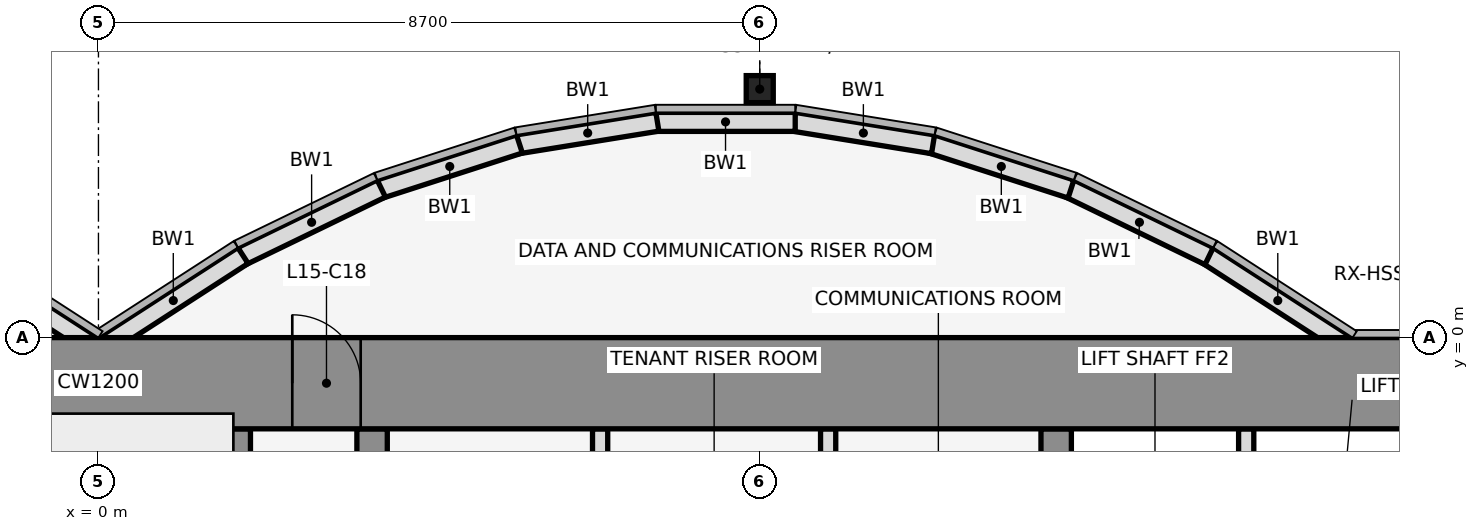
"""IFC4 building model, lengths in metres.
Left out: names, types, materials, properties, quantities, classifications, styles, units other than length and angle.
Written with IfcOpenShell. Run it as: python <this file> out.ifc"""

import sys

from ifc_helpers import new_model, si_unit, direction, frame, frame_2d, origin, origin_2d, place, context, subcontext, project, spatial, rectangle, hollow_rectangle, extrude, element, fill, save


model = new_model("IFC4")
c1 = context("Model", 3, precision=1e-05, world=origin(), true_north=direction((0.0, 1.0)))
c2 = subcontext(c1, "Body", "Model", "MODEL_VIEW")
j1 = project(units=[si_unit("LENGTHUNIT", "METRE"), si_unit("PLANEANGLEUNIT", "RADIAN")], contexts=[c1])
p1 = place(None, origin())
s1 = spatial("IfcSite", under=j1, at=p1, CompositionType="ELEMENT")
p2 = place(p1, origin())
s2 = spatial("IfcBuilding", under=s1, at=p2, CompositionType="ELEMENT")
p3 = place(p2, frame((0.0, 0.0, 75.5)))
s3 = spatial("IfcBuildingStorey", under=s2, at=p3, CompositionType="ELEMENT", Elevation=75.5)
p4 = place(p3, frame((8.7, 3.269, 0.0), z_axis=(0.0, 0.0, 1.0), x_axis=(1.0, 0.0, 0.0)))
e1 = element("IfcColumn", 1, at=p4, inside=s3, PredefinedType="COLUMN", context=c2, shape_type="SweptSolid", body=[
    extrude(hollow_rectangle(XDim=0.356, YDim=0.356, WallThickness=0.012, at=origin_2d()), origin(), (0.0, 0.0, 1.0), 4.5),
])
p5 = place(p3, frame((16.432, -0.105, 0.0), z_axis=(0.0, 0.0, 1.0), x_axis=(-0.83981312244, 0.542875602121, 0.0)))
e2 = element("IfcWall", 2, at=p5, inside=s3, PredefinedType="STANDARD", context=c2, shape_type="SweptSolid", body=[
    extrude(rectangle(XDim=2.183, YDim=0.25, at=frame_2d((1.091, 0.0))), origin(), (0.0, 0.0, 1.0), 4.35),
])
p6 = place(p3, frame((14.612, 1.073, 0.0), z_axis=(0.0, 0.0, 1.0), x_axis=(-0.89982408427, 0.436252928206, 0.0)))
e3 = element("IfcWall", 3, at=p6, inside=s3, PredefinedType="STANDARD", context=c2, shape_type="SweptSolid", body=[
    extrude(rectangle(XDim=2.038, YDim=0.25, at=frame_2d((1.019, 0.0))), origin(), (0.0, 0.0, 1.0), 4.35),
])
p7 = place(p3, frame((12.795, 1.955, 0.0), z_axis=(0.0, 0.0, 1.0), x_axis=(-0.951495806175, 0.307661714928, 0.0)))
e4 = element("IfcWall", 4, at=p7, inside=s3, PredefinedType="STANDARD", context=c2, shape_type="SweptSolid", body=[
    extrude(rectangle(XDim=1.927, YDim=0.25, at=frame_2d((0.963, 0.0))), origin(), (0.0, 0.0, 1.0), 4.35),
])
p8 = place(p3, frame((10.98, 2.543, 0.0), z_axis=(0.0, 0.0, 1.0), x_axis=(-0.987181718931, 0.159600293885, 0.0)))
e5 = element("IfcWall", 5, at=p8, inside=s3, PredefinedType="STANDARD", context=c2, shape_type="SweptSolid", body=[
    extrude(rectangle(XDim=1.857, YDim=0.25, at=frame_2d((0.929, 0.0))), origin(), (0.0, 0.0, 1.0), 4.35),
])
p9 = place(p3, frame((9.167, 2.838, 0.0), z_axis=(0.0, 0.0, 1.0), x_axis=(-1.0, 0.0, 0.0)))
e6 = element("IfcWall", 6, at=p9, inside=s3, PredefinedType="STANDARD", context=c2, shape_type="SweptSolid", body=[
    extrude(rectangle(XDim=1.833, YDim=0.25, at=frame_2d((0.917, 0.0))), origin(), (0.0, 0.0, 1.0), 4.35),
])
p10 = place(p3, frame((7.353, 2.84, 0.0), z_axis=(0.0, 0.0, 1.0), x_axis=(-0.987181718931, -0.159600293885, 0.0)))
e7 = element("IfcWall", 7, at=p10, inside=s3, PredefinedType="STANDARD", context=c2, shape_type="SweptSolid", body=[
    extrude(rectangle(XDim=1.857, YDim=0.25, at=frame_2d((0.929, 0.0))), origin(), (0.0, 0.0, 1.0), 4.35),
])
p11 = place(p3, frame((5.538, 2.548, 0.0), z_axis=(0.0, 0.0, 1.0), x_axis=(-0.951495806175, -0.307661714928, 0.0)))
e8 = element("IfcWall", 8, at=p11, inside=s3, PredefinedType="STANDARD", context=c2, shape_type="SweptSolid", body=[
    extrude(rectangle(XDim=1.927, YDim=0.25, at=frame_2d((0.963, 0.0))), origin(), (0.0, 0.0, 1.0), 4.35),
])
p12 = place(p3, frame((3.721, 1.962, 0.0), z_axis=(0.0, 0.0, 1.0), x_axis=(-0.89982408427, -0.436252928206, 0.0)))
e9 = element("IfcWall", 9, at=p12, inside=s3, PredefinedType="STANDARD", context=c2, shape_type="SweptSolid", body=[
    extrude(rectangle(XDim=2.038, YDim=0.25, at=frame_2d((1.019, 0.0))), origin(), (0.0, 0.0, 1.0), 4.35),
])
for number, where, z_axis, x_axis in (
    (10, (1.901, 1.08, 0.0), (0.0, 0.0, 1.0), (-0.84, -0.543, 0.0)),
    (11, (-0.068, -0.105, 0.0), (0.0, 0.0, 1.0), (-0.84, 0.543, 0.0)),
):
    element("IfcWall", number, at=place(p3, frame(where, z_axis=z_axis, x_axis=x_axis)), inside=s3, PredefinedType="STANDARD", context=c2, shape_type="SweptSolid", body=[
        extrude(rectangle(XDim=2.183, YDim=0.25, at=frame_2d((1.091, 0.0))), origin(), (0.0, 0.0, 1.0), 4.35),
    ])
p13 = place(p3, frame((1.8, -11.8, 0.0), z_axis=(0.0, 0.0, 1.0), x_axis=(0.0, 1.0, 0.0)))
e12 = element("IfcWall", 12, at=p13, inside=s3, PredefinedType="SHEAR", context=c2, shape_type="SweptSolid", body=[
    extrude(rectangle(XDim=10.6, YDim=0.4, at=frame_2d((5.3, 0.0))), origin(), (0.0, 0.0, 1.0), 4.5),
])
p14 = place(p3, frame((3.6, -11.8, 0.0), z_axis=(0.0, 0.0, 1.0), x_axis=(0.0, 1.0, 0.0)))
e13 = element("IfcWall", 13, at=p14, inside=s3, PredefinedType="SHEAR", context=c2, shape_type="SweptSolid", body=[
    extrude(rectangle(XDim=10.6, YDim=0.4, at=frame_2d((5.3, 0.0))), origin(), (0.0, 0.0, 1.0), 4.5),
])
p15 = place(p14, frame((1.35, 0.0, 0.0)))
e14 = element("IfcOpeningElement", 14, at=p15, cuts=e13, PredefinedType="OPENING", context=c2, shape_type="SweptSolid", body=[
    extrude(rectangle(XDim=0.9, YDim=2.1, at=frame_2d((0.45, 1.05))), frame((0.0, 0.212, 0.0), z_axis=(0.0, -1.0, 0.0), x_axis=(1.0, 0.0, 0.0)), (0.0, 0.0, 1.0), 0.424),
])
for number, where, z_axis, x_axis in (
    (15, (6.6, -4.6, 0.0), (0.0, 0.0, 1.0), (0.0, 1.0, 0.0)),
    (16, (9.6, -4.6, 0.0), (0.0, 0.0, 1.0), (0.0, 1.0, 0.0)),
):
    element("IfcWall", number, at=place(p3, frame(where, z_axis=z_axis, x_axis=x_axis)), inside=s3, PredefinedType="PARTITIONING", context=c2, shape_type="SweptSolid", body=[
        extrude(rectangle(XDim=3.4, YDim=0.2, at=frame_2d((1.7, 0.0))), origin(), (0.0, 0.0, 1.0), 3.339),
    ])
p16 = place(p3, frame((12.6, -11.8, 0.0), z_axis=(0.0, 0.0, 1.0), x_axis=(0.0, 1.0, 0.0)))
e17 = element("IfcWall", 17, at=p16, inside=s3, PredefinedType="SHEAR", context=c2, shape_type="SweptSolid", body=[
    extrude(rectangle(XDim=10.6, YDim=0.4, at=frame_2d((5.3, 0.0))), origin(), (0.0, 0.0, 1.0), 4.5),
])
p17 = place(p16, frame((4.75, 0.0, 0.0)))
e18 = element("IfcOpeningElement", 18, at=p17, cuts=e17, PredefinedType="OPENING", context=c2, shape_type="SweptSolid", body=[
    extrude(rectangle(XDim=1.1, YDim=2.1, at=frame_2d((0.55, 1.05))), frame((0.0, 0.212, 0.0), z_axis=(0.0, -1.0, 0.0), x_axis=(1.0, 0.0, 0.0)), (0.0, 0.0, 1.0), 0.424),
])
p18 = place(p3, frame((15.1, -4.6, 0.0), z_axis=(0.0, 0.0, 1.0), x_axis=(0.0, 1.0, 0.0)))
e19 = element("IfcWall", 19, at=p18, inside=s3, PredefinedType="PARTITIONING", context=c2, shape_type="SweptSolid", body=[
    extrude(rectangle(XDim=3.4, YDim=0.2, at=frame_2d((1.7, 0.0))), origin(), (0.0, 0.0, 1.0), 3.339),
])
p19 = place(p3, frame((-22.0, -0.6, 0.0), z_axis=(0.0, 0.0, 1.0), x_axis=(1.0, 0.0, 0.0)))
e20 = element("IfcWall", 20, at=p19, inside=s3, PredefinedType="SHEAR", context=c2, shape_type="SweptSolid", body=[
    extrude(rectangle(XDim=44.0, YDim=1.2, at=frame_2d((22.0, 0.0))), origin(), (0.0, 0.0, 1.0), 4.5),
])
p20 = place(p19, frame((18.55, 0.0, 0.0)))
e21 = element("IfcOpeningElement", 21, at=p20, cuts=e20, PredefinedType="OPENING", context=c2, shape_type="SweptSolid", body=[
    extrude(rectangle(XDim=0.9, YDim=2.1, at=frame_2d((0.45, 1.05))), frame((0.0, 0.612, 0.0), z_axis=(0.0, -1.0, 0.0), x_axis=(1.0, 0.0, 0.0)), (0.0, 0.0, 1.0), 1.224),
])
p21 = place(p19, frame((24.55, 0.0, 0.0)))
e22 = element("IfcOpeningElement", 22, at=p21, cuts=e20, PredefinedType="OPENING", context=c2, shape_type="SweptSolid", body=[
    extrude(rectangle(XDim=0.9, YDim=2.1, at=frame_2d((0.45, 1.05))), frame((0.0, 0.612, 0.0), z_axis=(0.0, -1.0, 0.0), x_axis=(1.0, 0.0, 0.0)), (0.0, 0.0, 1.0), 1.224),
])
p22 = place(p21, origin())
e23 = element("IfcDoor", 23, at=p22, inside=s3, OperationType="SINGLE_SWING_LEFT", PredefinedType="DOOR", context=c2, shape_type="SweptSolid", body=[
    extrude(rectangle(XDim=0.9, YDim=2.1, at=frame_2d((0.45, 1.05))), frame((0.0, 0.025, 0.0), z_axis=(0.0, -1.0, 0.0), x_axis=(1.0, 0.0, 0.0)), (0.0, 0.0, 1.0), 0.05),
])
fill(e22, e23)
save(model, sys.argv[1])
